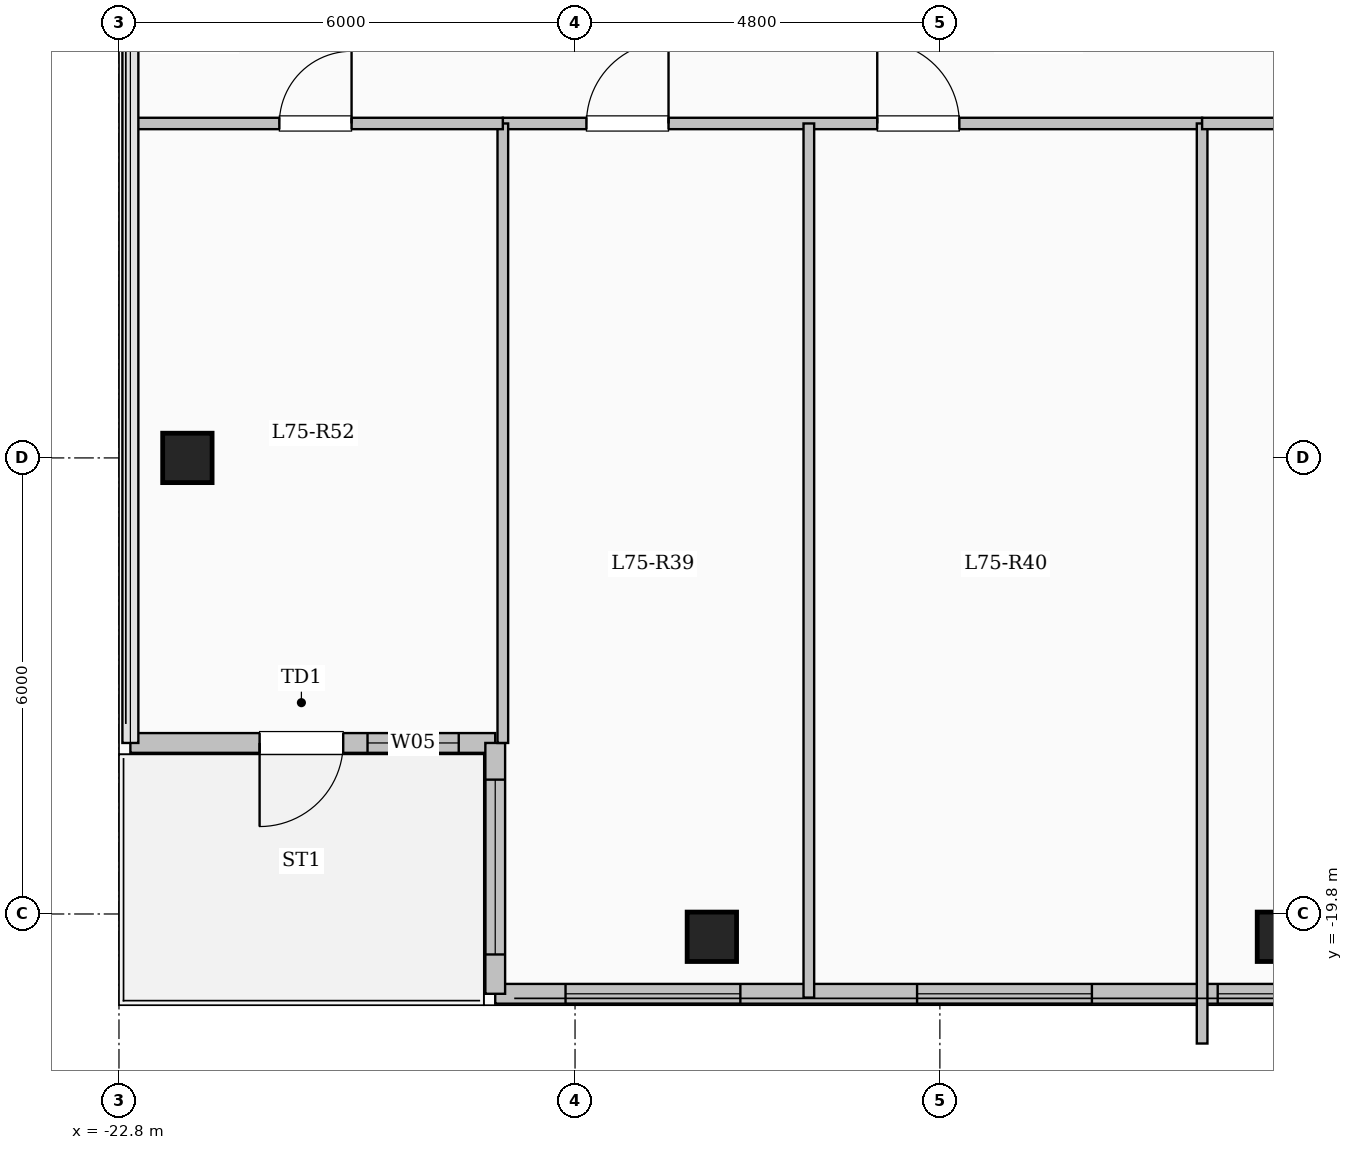
"""IFC4 building model, lengths in metres.
Left out: names, types, materials, properties, quantities, classifications, styles, units other than length and angle.
Written with IfcOpenShell. Run it as: python <this file> out.ifc"""

import sys

from ifc_helpers import new_model, si_unit, direction, frame, frame_2d, origin, origin_2d, place, context, subcontext, project, spatial, rectangle, extrude, element, fill, save


model = new_model("IFC4")
c1 = context("Model", 3, precision=1e-05, world=origin(), true_north=direction((0.0, 1.0)))
c2 = subcontext(c1, "Body", "Model", "MODEL_VIEW")
j1 = project(units=[si_unit("LENGTHUNIT", "METRE"), si_unit("PLANEANGLEUNIT", "RADIAN")], contexts=[c1])
p1 = place(None, origin())
s1 = spatial("IfcSite", under=j1, at=p1, CompositionType="ELEMENT")
p2 = place(p1, origin())
s2 = spatial("IfcBuilding", under=s1, at=p2, CompositionType="ELEMENT")
p3 = place(p2, frame((0.0, 0.0, 276.3)))
s3 = spatial("IfcBuildingStorey", under=s2, at=p3, CompositionType="ELEMENT", Elevation=276.3)
for number, where, z_axis, x_axis in (
    (1, (-15.0, -20.1, 0.0), (0.0, 0.0, 1.0), (1.0, 0.0, 0.0)),
    (2, (-7.5, -20.1, 0.0), (0.0, 0.0, 1.0), (1.0, 0.0, 0.0)),
    (3, (-21.9, -13.8, 0.0), (0.0, 0.0, 1.0), (1.0, 0.0, 0.0)),
):
    element("IfcColumn", number, at=place(p3, frame(where, z_axis=z_axis, x_axis=x_axis)), inside=s3, PredefinedType="COLUMN", context=c2, shape_type="SweptSolid", body=[
        extrude(rectangle(XDim=0.65, YDim=0.65, at=origin_2d()), origin(), (0.0, 0.0, 1.0), 5.25),
    ])
p4 = place(p3, frame((-17.85, -17.55, 0.0), z_axis=(0.0, 0.0, 1.0), x_axis=(-1.0, 0.0, 0.0)))
e4 = element("IfcWall", 4, at=p4, inside=s3, PredefinedType="SOLIDWALL", context=c2, shape_type="SweptSolid", body=[
    extrude(rectangle(XDim=4.8, YDim=0.26, at=frame_2d((2.4, 0.0))), origin(), (0.0, 0.0, 1.0), 4.95),
])
p5 = place(p4, frame((2.0, 0.0, 0.0)))
e5 = element("IfcOpeningElement", 5, at=p5, cuts=e4, PredefinedType="OPENING", context=c2, shape_type="SweptSolid", body=[
    extrude(rectangle(XDim=1.1, YDim=2.2, at=frame_2d((0.55, 1.1))), frame((0.0, 0.14, 0.0), z_axis=(0.0, -1.0, 0.0), x_axis=(1.0, 0.0, 0.0)), (0.0, 0.0, 1.0), 0.28),
])
p6 = place(p4, frame((0.48, 0.0, 0.95)))
e6 = element("IfcOpeningElement", 6, at=p6, cuts=e4, PredefinedType="OPENING", context=c2, shape_type="SweptSolid", body=[
    extrude(rectangle(XDim=1.2, YDim=1.5, at=frame_2d((0.6, 0.75))), frame((0.0, 0.14, 0.0), z_axis=(0.0, -1.0, 0.0), x_axis=(1.0, 0.0, 0.0)), (0.0, 0.0, 1.0), 0.28),
])
p7 = place(p3, frame((-7.35, -20.85, 0.0), z_axis=(0.0, 0.0, 1.0), x_axis=(-1.0, 0.0, 0.0)))
e7 = element("IfcWall", 7, at=p7, inside=s3, PredefinedType="SOLIDWALL", context=c2, shape_type="SweptSolid", body=[
    extrude(rectangle(XDim=10.5, YDim=0.26, at=frame_2d((5.25, 0.0))), origin(), (0.0, 0.0, 1.0), 4.95),
])
p8 = place(p7, frame((0.145, 0.0, 0.95)))
e8 = element("IfcOpeningElement", 8, at=p8, cuts=e7, PredefinedType="OPENING", context=c2, shape_type="SweptSolid", body=[
    extrude(rectangle(XDim=0.85, YDim=1.5, at=frame_2d((0.425, 0.75))), frame((0.0, 0.14, 0.0), z_axis=(0.0, -1.0, 0.0), x_axis=(1.0, 0.0, 0.0)), (0.0, 0.0, 1.0), 0.28),
])
p9 = place(p7, frame((2.65, 0.0, 0.85)))
e9 = element("IfcOpeningElement", 9, at=p9, cuts=e7, PredefinedType="OPENING", context=c2, shape_type="SweptSolid", body=[
    extrude(rectangle(XDim=2.3, YDim=2.2, at=frame_2d((1.15, 1.1))), frame((0.0, 0.14, 0.0), z_axis=(0.0, -1.0, 0.0), x_axis=(1.0, 0.0, 0.0)), (0.0, 0.0, 1.0), 0.28),
])
p10 = place(p7, frame((7.275, 0.0, 0.85)))
e10 = element("IfcOpeningElement", 10, at=p10, cuts=e7, PredefinedType="OPENING", context=c2, shape_type="SweptSolid", body=[
    extrude(rectangle(XDim=2.3, YDim=2.2, at=frame_2d((1.15, 1.1))), frame((0.0, 0.14, 0.0), z_axis=(0.0, -1.0, 0.0), x_axis=(1.0, 0.0, 0.0)), (0.0, 0.0, 1.0), 0.28),
])
p11 = place(p3, frame((-17.85, -20.85, 0.0), z_axis=(0.0, 0.0, 1.0), x_axis=(0.0, 1.0, 0.0)))
e11 = element("IfcWall", 11, at=p11, inside=s3, PredefinedType="SOLIDWALL", context=c2, shape_type="SweptSolid", body=[
    extrude(rectangle(XDim=3.3, YDim=0.26, at=frame_2d((1.65, 0.0))), origin(), (0.0, 0.0, 1.0), 4.95),
])
p12 = place(p11, frame((0.518, 0.0, 0.85)))
e12 = element("IfcOpeningElement", 12, at=p12, cuts=e11, PredefinedType="OPENING", context=c2, shape_type="SweptSolid", body=[
    extrude(rectangle(XDim=2.3, YDim=2.2, at=frame_2d((1.15, 1.1))), frame((0.0, 0.14, 0.0), z_axis=(0.0, -1.0, 0.0), x_axis=(1.0, 0.0, 0.0)), (0.0, 0.0, 1.0), 0.28),
])
p13 = place(p3, frame((-17.75, -9.4, 0.0), z_axis=(0.0, 0.0, 1.0), x_axis=(1.0, 0.0, 0.0)))
e13 = element("IfcWall", 13, at=p13, inside=s3, PredefinedType="PARTITIONING", context=c2, shape_type="SweptSolid", body=[
    extrude(rectangle(XDim=9.2, YDim=0.15, at=frame_2d((4.6, 0.0))), origin(), (0.0, 0.0, 1.0), 4.95),
])
p14 = place(p13, frame((1.1, 0.0, 0.0)))
e14 = element("IfcOpeningElement", 14, at=p14, cuts=e13, PredefinedType="OPENING", context=c2, shape_type="SweptSolid", body=[
    extrude(rectangle(XDim=1.08, YDim=2.15, at=frame_2d((0.54, 1.075))), frame((0.0, 0.085, 0.0), z_axis=(0.0, -1.0, 0.0), x_axis=(1.0, 0.0, 0.0)), (0.0, 0.0, 1.0), 0.17),
])
p15 = place(p13, frame((4.926, 0.0, 0.0)))
e15 = element("IfcOpeningElement", 15, at=p15, cuts=e13, PredefinedType="OPENING", context=c2, shape_type="SweptSolid", body=[
    extrude(rectangle(XDim=1.08, YDim=2.15, at=frame_2d((0.54, 1.075))), frame((0.0, 0.085, 0.0), z_axis=(0.0, -1.0, 0.0), x_axis=(1.0, 0.0, 0.0)), (0.0, 0.0, 1.0), 0.17),
])
p16 = place(p3, frame((-13.724, -20.9, 0.0), z_axis=(0.0, 0.0, 1.0), x_axis=(0.0, 1.0, 0.0)))
e16 = element("IfcWall", 16, at=p16, inside=s3, PredefinedType="PARTITIONING", context=c2, shape_type="SweptSolid", body=[
    extrude(rectangle(XDim=11.5, YDim=0.14, at=frame_2d((5.75, 0.0))), origin(), (0.0, 0.0, 1.0), 4.95),
])
p17 = place(p3, frame((-8.55, -21.504, 0.0), z_axis=(0.0, 0.0, 1.0), x_axis=(0.0, 1.0, 0.0)))
e17 = element("IfcWall", 17, at=p17, inside=s3, PredefinedType="PARTITIONING", context=c2, shape_type="SweptSolid", body=[
    extrude(rectangle(XDim=12.104, YDim=0.14, at=frame_2d((6.052, 0.0))), origin(), (0.0, 0.0, 1.0), 4.95),
])
p18 = place(p3, frame((-8.55, -9.4, 0.0), z_axis=(0.0, 0.0, 1.0), x_axis=(1.0, 0.0, 0.0)))
e18 = element("IfcWall", 18, at=p18, inside=s3, PredefinedType="PARTITIONING", context=c2, shape_type="SweptSolid", body=[
    extrude(rectangle(XDim=17.1, YDim=0.15, at=frame_2d((8.55, 0.0))), origin(), (0.0, 0.0, 1.0), 4.95),
])
p19 = place(p18, frame((1.7, 0.0, 0.0)))
e19 = element("IfcOpeningElement", 19, at=p19, cuts=e18, PredefinedType="OPENING", context=c2, shape_type="SweptSolid", body=[
    extrude(rectangle(XDim=1.08, YDim=2.15, at=frame_2d((0.54, 1.075))), frame((0.0, 0.085, 0.0), z_axis=(0.0, -1.0, 0.0), x_axis=(1.0, 0.0, 0.0)), (0.0, 0.0, 1.0), 0.17),
])
p20 = place(p18, frame((10.5, 0.0, 0.0)))
e20 = element("IfcOpeningElement", 20, at=p20, cuts=e18, PredefinedType="OPENING", context=c2, shape_type="SweptSolid", body=[
    extrude(rectangle(XDim=1.08, YDim=2.15, at=frame_2d((0.54, 1.075))), frame((0.0, 0.085, 0.0), z_axis=(0.0, -1.0, 0.0), x_axis=(1.0, 0.0, 0.0)), (0.0, 0.0, 1.0), 0.17),
])
p21 = place(p3, frame((-17.75, -17.55, 0.0), z_axis=(0.0, 0.0, 1.0), x_axis=(0.0, 1.0, 0.0)))
e21 = element("IfcWall", 21, at=p21, inside=s3, PredefinedType="PARTITIONING", context=c2, shape_type="SweptSolid", body=[
    extrude(rectangle(XDim=8.15, YDim=0.14, at=frame_2d((4.075, 0.0))), origin(), (0.0, 0.0, 1.0), 4.95),
])
p22 = place(p3, frame((-22.68, -9.4, 0.0), z_axis=(0.0, 0.0, 1.0), x_axis=(1.0, 0.0, 0.0)))
e22 = element("IfcWall", 22, at=p22, inside=s3, PredefinedType="PARTITIONING", context=c2, shape_type="SweptSolid", body=[
    extrude(rectangle(XDim=4.93, YDim=0.15, at=frame_2d((2.465, 0.0))), origin(), (0.0, 0.0, 1.0), 4.95),
])
p23 = place(p22, frame((1.99, 0.0, 0.0)))
e23 = element("IfcOpeningElement", 23, at=p23, cuts=e22, PredefinedType="OPENING", context=c2, shape_type="SweptSolid", body=[
    extrude(rectangle(XDim=0.95, YDim=2.15, at=frame_2d((0.475, 1.075))), frame((0.0, 0.085, 0.0), z_axis=(0.0, -1.0, 0.0), x_axis=(1.0, 0.0, 0.0)), (0.0, 0.0, 1.0), 0.17),
])
p24 = place(p5, origin())
e24 = element("IfcDoor", 24, at=p24, inside=s3, OperationType="SINGLE_SWING_RIGHT", PredefinedType="DOOR", context=c2, shape_type="SweptSolid", body=[
    extrude(rectangle(XDim=1.1, YDim=2.2, at=frame_2d((0.55, 1.1))), frame((0.0, 0.025, 0.0), z_axis=(0.0, -1.0, 0.0), x_axis=(1.0, 0.0, 0.0)), (0.0, 0.0, 1.0), 0.05),
])
fill(e5, e24)
p25 = place(p6, origin())
e25 = element("IfcWindow", 25, at=p25, inside=s3, PartitioningType="SINGLE_PANEL", PredefinedType="WINDOW", context=c2, shape_type="SweptSolid", body=[
    extrude(rectangle(XDim=1.2, YDim=1.5, at=frame_2d((0.6, 0.75))), frame((0.0, 0.03, 0.0), z_axis=(0.0, -1.0, 0.0), x_axis=(1.0, 0.0, 0.0)), (0.0, 0.0, 1.0), 0.06),
])
fill(e6, e25)
p26 = place(p8, origin())
e26 = element("IfcWindow", 26, at=p26, inside=s3, PartitioningType="SINGLE_PANEL", PredefinedType="WINDOW", context=c2, shape_type="SweptSolid", body=[
    extrude(rectangle(XDim=0.85, YDim=1.5, at=frame_2d((0.425, 0.75))), frame((0.0, 0.03, 0.0), z_axis=(0.0, -1.0, 0.0), x_axis=(1.0, 0.0, 0.0)), (0.0, 0.0, 1.0), 0.06),
])
fill(e8, e26)
p27 = place(p9, origin())
e27 = element("IfcWindow", 27, at=p27, inside=s3, PartitioningType="SINGLE_PANEL", PredefinedType="WINDOW", context=c2, shape_type="SweptSolid", body=[
    extrude(rectangle(XDim=2.3, YDim=2.2, at=frame_2d((1.15, 1.1))), frame((0.0, 0.03, 0.0), z_axis=(0.0, -1.0, 0.0), x_axis=(1.0, 0.0, 0.0)), (0.0, 0.0, 1.0), 0.06),
])
fill(e9, e27)
p28 = place(p10, origin())
e28 = element("IfcWindow", 28, at=p28, inside=s3, PartitioningType="SINGLE_PANEL", PredefinedType="WINDOW", context=c2, shape_type="SweptSolid", body=[
    extrude(rectangle(XDim=2.3, YDim=2.2, at=frame_2d((1.15, 1.1))), frame((0.0, 0.03, 0.0), z_axis=(0.0, -1.0, 0.0), x_axis=(1.0, 0.0, 0.0)), (0.0, 0.0, 1.0), 0.06),
])
fill(e10, e28)
p29 = place(p12, origin())
e29 = element("IfcWindow", 29, at=p29, inside=s3, PartitioningType="SINGLE_PANEL", PredefinedType="WINDOW", context=c2, shape_type="SweptSolid", body=[
    extrude(rectangle(XDim=2.3, YDim=2.2, at=frame_2d((1.15, 1.1))), frame((0.0, 0.03, 0.0), z_axis=(0.0, -1.0, 0.0), x_axis=(1.0, 0.0, 0.0)), (0.0, 0.0, 1.0), 0.06),
])
fill(e12, e29)
p30 = place(p14, origin())
e30 = element("IfcDoor", 30, at=p30, inside=s3, OperationType="SINGLE_SWING_RIGHT", PredefinedType="DOOR", context=c2, shape_type="SweptSolid", body=[
    extrude(rectangle(XDim=1.08, YDim=2.15, at=frame_2d((0.54, 1.075))), frame((0.0, 0.025, 0.0), z_axis=(0.0, -1.0, 0.0), x_axis=(1.0, 0.0, 0.0)), (0.0, 0.0, 1.0), 0.05),
])
fill(e14, e30)
p31 = place(p15, origin())
e31 = element("IfcDoor", 31, at=p31, inside=s3, OperationType="SINGLE_SWING_LEFT", PredefinedType="DOOR", context=c2, shape_type="SweptSolid", body=[
    extrude(rectangle(XDim=1.08, YDim=2.15, at=frame_2d((0.54, 1.075))), frame((0.0, 0.025, 0.0), z_axis=(0.0, -1.0, 0.0), x_axis=(1.0, 0.0, 0.0)), (0.0, 0.0, 1.0), 0.05),
])
fill(e15, e31)
p32 = place(p23, origin())
e32 = element("IfcDoor", 32, at=p32, inside=s3, OperationType="SINGLE_SWING_RIGHT", PredefinedType="DOOR", context=c2, shape_type="SweptSolid", body=[
    extrude(rectangle(XDim=0.95, YDim=2.15, at=frame_2d((0.475, 1.075))), frame((0.0, 0.025, 0.0), z_axis=(0.0, -1.0, 0.0), x_axis=(1.0, 0.0, 0.0)), (0.0, 0.0, 1.0), 0.05),
])
fill(e23, e32)
save(model, sys.argv[1])
